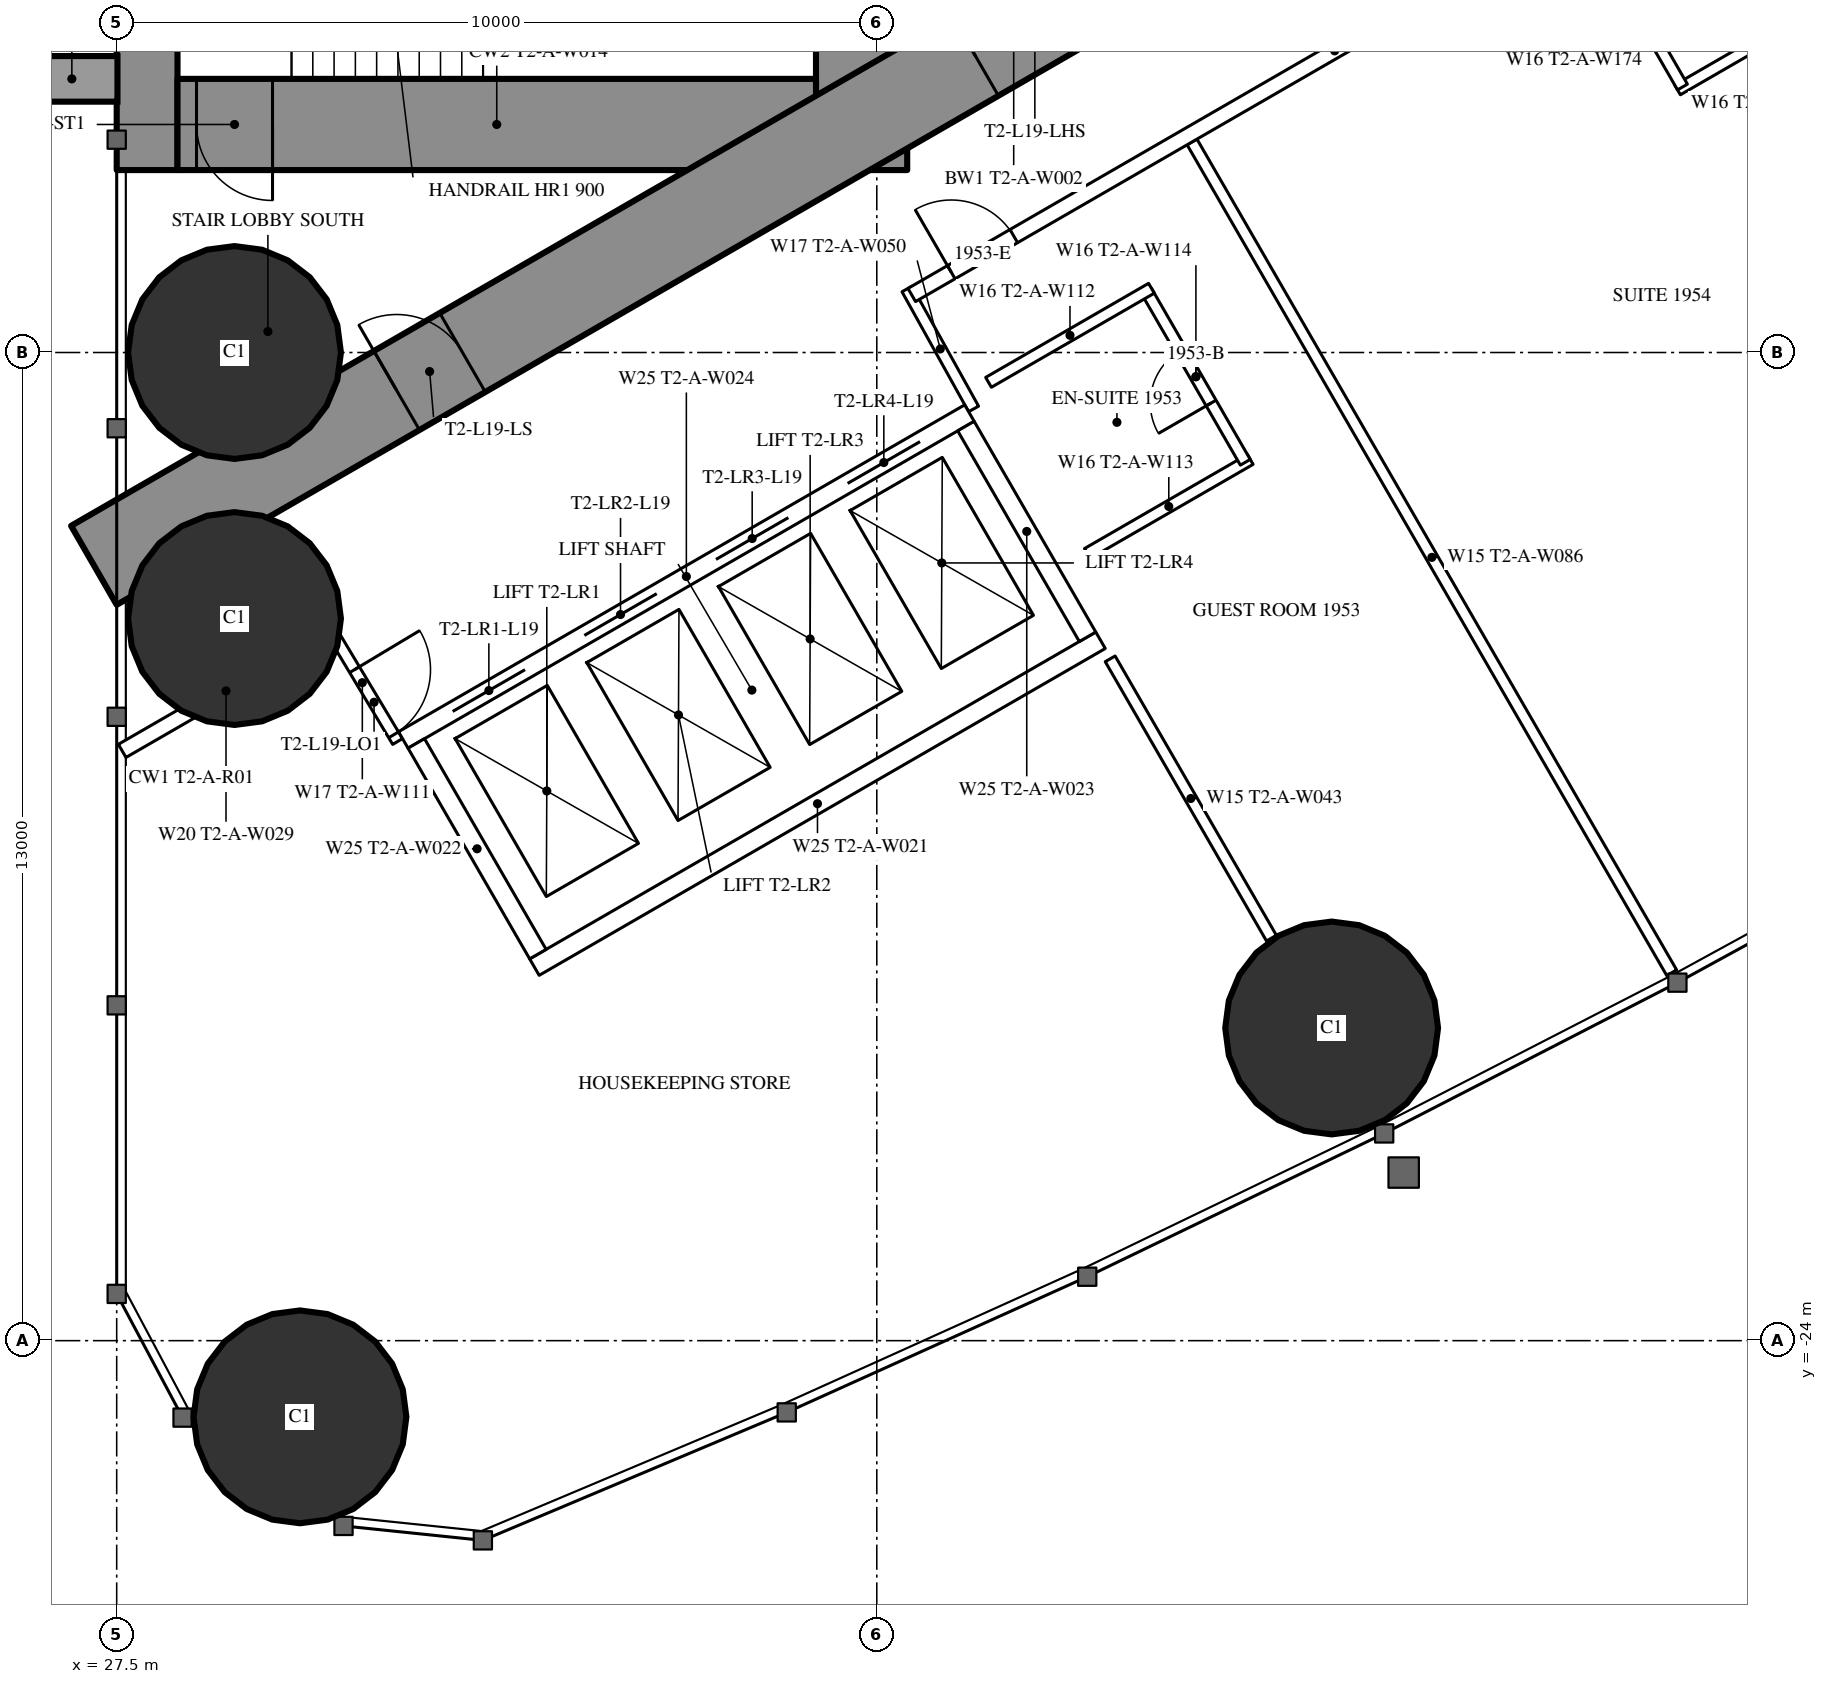
"""IFC4 building model, lengths in metres.
Left out: names, types, materials, properties, quantities, classifications, styles, units other than length and angle.
Written with IfcOpenShell. Run it as: python <this file> out.ifc"""

import sys

from ifc_helpers import new_model, si_unit, direction, frame, frame_2d, origin, origin_2d, place, context, subcontext, project, spatial, rectangle, hollow_circle, extrude, element, fill, save


model = new_model("IFC4")
c1 = context("Model", 3, precision=1e-05, world=origin(), true_north=direction((0.0, 1.0)))
c2 = subcontext(c1, "Body", "Model", "MODEL_VIEW")
j1 = project(units=[si_unit("LENGTHUNIT", "METRE"), si_unit("PLANEANGLEUNIT", "RADIAN")], contexts=[c1])
p1 = place(None, origin())
s1 = spatial("IfcSite", under=j1, at=p1, CompositionType="ELEMENT")
p2 = place(p1, origin())
s2 = spatial("IfcBuilding", under=s1, at=p2, CompositionType="ELEMENT")
p3 = place(p2, frame((0.0, 0.0, 74.0)))
s3 = spatial("IfcBuildingStorey", under=s2, at=p3, CompositionType="ELEMENT", Elevation=74.0)
for number, where, z_axis, x_axis in (
    (1, (29.911, -25.002, 0.0), (0.0, 0.0, 1.0), (1.0, 0.0, 0.0)),
    (2, (29.05, -11.0, 0.0), (0.0, 0.0, 1.0), (1.0, 0.0, 0.0)),
    (3, (29.05, -14.5, 0.0), (0.0, 0.0, 1.0), (1.0, 0.0, 0.0)),
    (4, (43.484, -19.886, 0.0), (0.0, 0.0, 1.0), (1.0, 0.0, 0.0)),
):
    element("IfcColumn", number, at=place(p3, frame(where, z_axis=z_axis, x_axis=x_axis)), inside=s3, PredefinedType="COLUMN", context=c2, shape_type="SweptSolid", body=[
        extrude(hollow_circle(Radius=1.4, WallThickness=0.12, at=origin_2d()), origin(), (0.0, 0.0, 1.0), 3.5),
    ])
p4 = place(p3, frame((27.9, -8.6, 0.0), z_axis=(0.0, 0.0, 1.0), x_axis=(0.0, 1.0, 0.0)))
e5 = element("IfcWall", 5, at=p4, inside=s3, PredefinedType="SHEAR", context=c2, shape_type="SweptSolid", body=[
    extrude(rectangle(XDim=17.2, YDim=0.8, at=frame_2d((8.6, 0.0))), origin(), (0.0, 0.0, 1.0), 3.5),
])
p5 = place(p4, frame((2.45, 0.0, 0.6)))
e6 = element("IfcOpeningElement", 6, at=p5, cuts=e5, PredefinedType="OPENING", context=c2, shape_type="SweptSolid", body=[
    extrude(rectangle(XDim=0.6, YDim=2.1, at=frame_2d((0.3, 1.05))), frame((0.0, 0.41, 0.0), z_axis=(0.0, -1.0, 0.0), x_axis=(1.0, 0.0, 0.0)), (0.0, 0.0, 1.0), 0.82),
])
p6 = place(p4, frame((14.15, 0.0, 0.6)))
e7 = element("IfcOpeningElement", 7, at=p6, cuts=e5, PredefinedType="OPENING", context=c2, shape_type="SweptSolid", body=[
    extrude(rectangle(XDim=0.6, YDim=2.1, at=frame_2d((0.3, 1.05))), frame((0.0, 0.41, 0.0), z_axis=(0.0, -1.0, 0.0), x_axis=(1.0, 0.0, 0.0)), (0.0, 0.0, 1.0), 0.82),
])
p7 = place(p3, frame((37.3, -8.6, 0.0), z_axis=(0.0, 0.0, 1.0), x_axis=(0.0, 1.0, 0.0)))
e8 = element("IfcWall", 8, at=p7, inside=s3, PredefinedType="SHEAR", context=c2, shape_type="SweptSolid", body=[
    extrude(rectangle(XDim=17.2, YDim=1.2, at=frame_2d((8.6, 0.0))), origin(), (0.0, 0.0, 1.0), 3.5),
])
p8 = place(p7, frame((7.7, 0.0, 0.0)))
e9 = element("IfcOpeningElement", 9, at=p8, cuts=e8, PredefinedType="OPENING", context=c2, shape_type="SweptSolid", body=[
    extrude(rectangle(XDim=1.8, YDim=2.2, at=frame_2d((0.9, 1.1))), frame((0.0, 0.61, 0.0), z_axis=(0.0, -1.0, 0.0), x_axis=(1.0, 0.0, 0.0)), (0.0, 0.0, 1.0), 1.22),
])
p9 = place(p3, frame((28.3, -8.0, 0.0), z_axis=(0.0, 0.0, 1.0), x_axis=(1.0, 0.0, 0.0)))
e10 = element("IfcWall", 10, at=p9, inside=s3, PredefinedType="SHEAR", context=c2, shape_type="SweptSolid", body=[
    extrude(rectangle(XDim=8.4, YDim=1.2, at=frame_2d((4.2, 0.0))), origin(), (0.0, 0.0, 1.0), 3.5),
])
p10 = place(p9, frame((0.25, 0.0, 0.0)))
e11 = element("IfcOpeningElement", 11, at=p10, cuts=e10, PredefinedType="OPENING", context=c2, shape_type="SweptSolid", body=[
    extrude(rectangle(XDim=1.0, YDim=2.2, at=frame_2d((0.5, 1.1))), frame((0.0, 0.61, 0.0), z_axis=(0.0, -1.0, 0.0), x_axis=(1.0, 0.0, 0.0)), (0.0, 0.0, 1.0), 1.22),
])
p11 = place(p3, frame((27.2, -13.8, 0.0), z_axis=(0.0, 0.0, 1.0), x_axis=(0.866027159892, 0.499996958321, 0.0)))
e12 = element("IfcWall", 12, at=p11, inside=s3, PredefinedType="SHEAR", context=c2, shape_type="SweptSolid", body=[
    extrude(rectangle(XDim=27.947, YDim=1.2, at=frame_2d((13.973, 0.0))), origin(), (0.0, 0.0, 1.0), 3.5),
])
p12 = place(p11, frame((4.6, 0.0, 0.0)))
e13 = element("IfcOpeningElement", 13, at=p12, cuts=e12, PredefinedType="OPENING", context=c2, shape_type="SweptSolid", body=[
    extrude(rectangle(XDim=1.0, YDim=2.2, at=frame_2d((0.5, 1.1))), frame((0.0, 0.61, 0.0), z_axis=(0.0, -1.0, 0.0), x_axis=(1.0, 0.0, 0.0)), (0.0, 0.0, 1.0), 1.22),
])
p13 = place(p11, frame((13.395, 0.0, 0.0)))
e14 = element("IfcOpeningElement", 14, at=p13, cuts=e12, PredefinedType="OPENING", context=c2, shape_type="SweptSolid", body=[
    extrude(rectangle(XDim=1.8, YDim=2.2, at=frame_2d((0.9, 1.1))), frame((0.0, 0.61, 0.0), z_axis=(0.0, -1.0, 0.0), x_axis=(1.0, 0.0, 0.0)), (0.0, 0.0, 1.0), 1.22),
])
p14 = place(p3, frame((41.647, -8.23, 0.0), z_axis=(0.0, 0.0, 1.0), x_axis=(0.49998590462, -0.866033541603, 0.0)))
e15 = element("IfcWall", 15, at=p14, inside=s3, PredefinedType="PARTITIONING", context=c2, shape_type="SweptSolid", body=[
    extrude(rectangle(XDim=12.621, YDim=0.15, at=frame_2d((6.311, 0.0))), origin(), (0.0, 0.0, 1.0), 3.25),
])
p15 = place(p3, frame((40.57, -15.03, 0.0), z_axis=(0.0, 0.0, 1.0), x_axis=(0.500012993597, -0.866017901798, 0.0)))
e16 = element("IfcWall", 16, at=p15, inside=s3, PredefinedType="PARTITIONING", context=c2, shape_type="SweptSolid", body=[
    extrude(rectangle(XDim=4.243, YDim=0.15, at=frame_2d((2.122, 0.0))), origin(), (0.0, 0.0, 1.0), 3.25),
])
p16 = place(p3, frame((27.572, -16.241, 0.0), z_axis=(0.0, 0.0, 1.0), x_axis=(0.866029654818, 0.499992636921, 0.0)))
e17 = element("IfcWall", 17, at=p16, inside=s3, PredefinedType="PARTITIONING", context=c2, shape_type="SweptSolid", body=[
    extrude(rectangle(XDim=3.155, YDim=0.2, at=frame_2d((1.577, 0.0))), origin(), (0.0, 0.0, 1.0), 3.25),
])
p17 = place(p3, frame((38.773, -11.742, 0.0), z_axis=(0.0, 0.0, 1.0), x_axis=(-0.485528096672, 0.8742210632, 0.0)))
e18 = element("IfcWall", 18, at=p17, inside=s3, PredefinedType="PARTITIONING", context=c2, shape_type="SweptSolid", body=[
    extrude(rectangle(XDim=1.805, YDim=0.15, at=frame_2d((0.903, 0.0))), origin(), (0.0, 0.0, 1.0), 3.25),
])
p18 = place(p3, frame((30.267, -14.569, 0.0), z_axis=(0.0, 0.0, 1.0), x_axis=(0.514336634837, -0.857588377991, 0.0)))
e19 = element("IfcWall", 19, at=p18, inside=s3, PredefinedType="PARTITIONING", context=c2, shape_type="SweptSolid", body=[
    extrude(rectangle(XDim=1.805, YDim=0.15, at=frame_2d((0.903, 0.0))), origin(), (0.0, 0.0, 1.0), 3.25),
])
p19 = place(p18, frame((0.703, 0.0, 0.0)))
e20 = element("IfcOpeningElement", 20, at=p19, cuts=e19, PredefinedType="OPENING", context=c2, shape_type="SweptSolid", body=[
    extrude(rectangle(XDim=1.0, YDim=2.2, at=frame_2d((0.5, 1.1))), frame((0.0, 0.085, 0.0), z_axis=(0.0, -1.0, 0.0), x_axis=(1.0, 0.0, 0.0)), (0.0, 0.0, 1.0), 0.17),
])
p20 = place(p3, frame((37.96, -10.243, 0.0), z_axis=(0.0, 0.0, 1.0), x_axis=(0.866030548046, 0.499991089772, 0.0)))
e21 = element("IfcWall", 21, at=p20, inside=s3, PredefinedType="PARTITIONING", context=c2, shape_type="SweptSolid", body=[
    extrude(rectangle(XDim=12.849, YDim=0.2, at=frame_2d((6.425, 0.0))), origin(), (0.0, 0.0, 1.0), 3.25),
])
p21 = place(p20, frame((8.949, 0.0, 0.0)))
e22 = element("IfcOpeningElement", 22, at=p21, cuts=e21, PredefinedType="OPENING", context=c2, shape_type="SweptSolid", body=[
    extrude(rectangle(XDim=0.95, YDim=2.2, at=frame_2d((0.475, 1.1))), frame((0.0, 0.11, 0.0), z_axis=(0.0, -1.0, 0.0), x_axis=(1.0, 0.0, 0.0)), (0.0, 0.0, 1.0), 0.22),
])
p22 = place(p20, frame((0.6, 0.0, 0.0)))
e23 = element("IfcOpeningElement", 23, at=p22, cuts=e21, PredefinedType="OPENING", context=c2, shape_type="SweptSolid", body=[
    extrude(rectangle(XDim=0.95, YDim=2.2, at=frame_2d((0.475, 1.1))), frame((0.0, 0.11, 0.0), z_axis=(0.0, -1.0, 0.0), x_axis=(1.0, 0.0, 0.0)), (0.0, 0.0, 1.0), 0.22),
])
p23 = place(p3, frame((48.035, -7.545, 0.0), z_axis=(0.0, 0.0, 1.0), x_axis=(0.866006523861, 0.500032699561, 0.0)))
e24 = element("IfcWall", 24, at=p23, inside=s3, PredefinedType="PARTITIONING", context=c2, shape_type="SweptSolid", body=[
    extrude(rectangle(XDim=2.475, YDim=0.15, at=frame_2d((1.237, 0.0))), origin(), (0.0, 0.0, 1.0), 3.25),
])
p24 = place(p3, frame((46.8, -5.255, 0.0), z_axis=(0.0, 0.0, 1.0), x_axis=(0.500006934395, -0.866021400173, 0.0)))
e25 = element("IfcWall", 25, at=p24, inside=s3, PredefinedType="PARTITIONING", context=c2, shape_type="SweptSolid", body=[
    extrude(rectangle(XDim=2.6, YDim=0.15, at=frame_2d((1.3, 0.0))), origin(), (0.0, 0.0, 1.0), 3.25),
])
p25 = place(p24, frame((0.9, 0.0, 0.0)))
e26 = element("IfcOpeningElement", 26, at=p25, cuts=e25, PredefinedType="OPENING", context=c2, shape_type="SweptSolid", body=[
    extrude(rectangle(XDim=0.8, YDim=2.2, at=frame_2d((0.4, 1.1))), frame((0.0, 0.085, 0.0), z_axis=(0.0, -1.0, 0.0), x_axis=(1.0, 0.0, 0.0)), (0.0, 0.0, 1.0), 0.17),
])
p26 = place(p3, frame((40.27, -13.644, 0.0), z_axis=(0.0, 0.0, 1.0), x_axis=(0.866031185235, 0.4999899861, 0.0)))
e27 = element("IfcWall", 27, at=p26, inside=s3, PredefinedType="PARTITIONING", context=c2, shape_type="SweptSolid", body=[
    extrude(rectangle(XDim=2.475, YDim=0.15, at=frame_2d((1.238, 0.0))), origin(), (0.0, 0.0, 1.0), 3.25),
])
p27 = place(p3, frame((41.048, -10.193, 0.0), z_axis=(0.0, 0.0, 1.0), x_axis=(0.500047596559, -0.865997922154, 0.0)))
e28 = element("IfcWall", 28, at=p27, inside=s3, PredefinedType="PARTITIONING", context=c2, shape_type="SweptSolid", body=[
    extrude(rectangle(XDim=2.6, YDim=0.15, at=frame_2d((1.3, 0.0))), origin(), (0.0, 0.0, 1.0), 3.25),
])
p28 = place(p27, frame((0.9, 0.0, 0.0)))
e29 = element("IfcOpeningElement", 29, at=p28, cuts=e28, PredefinedType="OPENING", context=c2, shape_type="SweptSolid", body=[
    extrude(rectangle(XDim=0.8, YDim=2.2, at=frame_2d((0.4, 1.1))), frame((0.0, 0.085, 0.0), z_axis=(0.0, -1.0, 0.0), x_axis=(1.0, 0.0, 0.0)), (0.0, 0.0, 1.0), 0.17),
])
p29 = place(p3, frame((38.97, -11.393, 0.0), z_axis=(0.0, 0.0, 1.0), x_axis=(0.866031185235, 0.4999899861, 0.0)))
e30 = element("IfcWall", 30, at=p29, inside=s3, PredefinedType="PARTITIONING", context=c2, shape_type="SweptSolid", body=[
    extrude(rectangle(XDim=2.475, YDim=0.15, at=frame_2d((1.238, 0.0))), origin(), (0.0, 0.0, 1.0), 3.25),
])
p30 = place(p3, frame((31.271, -16.097, 0.0), z_axis=(0.0, 0.0, 1.0), x_axis=(0.86604045752, 0.499973925258, 0.0)))
e31 = element("IfcWall", 31, at=p30, inside=s3, PredefinedType="PARTITIONING", context=c2, shape_type="SweptSolid", body=[
    extrude(rectangle(XDim=8.6, YDim=0.25, at=frame_2d((4.3, 0.0))), origin(), (0.0, 0.0, 1.0), 3.25),
])
p31 = place(p30, frame((0.75, 0.0, 0.0)))
e32 = element("IfcOpeningElement", 32, at=p31, cuts=e31, PredefinedType="OPENING", context=c2, shape_type="SweptSolid", body=[
    extrude(rectangle(XDim=1.1, YDim=2.2, at=frame_2d((0.55, 1.1))), frame((0.0, 0.135, 0.0), z_axis=(0.0, -1.0, 0.0), x_axis=(1.0, 0.0, 0.0)), (0.0, 0.0, 1.0), 0.27),
])
p32 = place(p30, frame((2.75, 0.0, 0.0)))
e33 = element("IfcOpeningElement", 33, at=p32, cuts=e31, PredefinedType="OPENING", context=c2, shape_type="SweptSolid", body=[
    extrude(rectangle(XDim=1.1, YDim=2.2, at=frame_2d((0.55, 1.1))), frame((0.0, 0.135, 0.0), z_axis=(0.0, -1.0, 0.0), x_axis=(1.0, 0.0, 0.0)), (0.0, 0.0, 1.0), 0.27),
])
p33 = place(p30, frame((4.75, 0.0, 0.0)))
e34 = element("IfcOpeningElement", 34, at=p33, cuts=e31, PredefinedType="OPENING", context=c2, shape_type="SweptSolid", body=[
    extrude(rectangle(XDim=1.1, YDim=2.2, at=frame_2d((0.55, 1.1))), frame((0.0, 0.135, 0.0), z_axis=(0.0, -1.0, 0.0), x_axis=(1.0, 0.0, 0.0)), (0.0, 0.0, 1.0), 0.27),
])
p34 = place(p30, frame((6.75, 0.0, 0.0)))
e35 = element("IfcOpeningElement", 35, at=p34, cuts=e31, PredefinedType="OPENING", context=c2, shape_type="SweptSolid", body=[
    extrude(rectangle(XDim=1.1, YDim=2.2, at=frame_2d((0.55, 1.1))), frame((0.0, 0.135, 0.0), z_axis=(0.0, -1.0, 0.0), x_axis=(1.0, 0.0, 0.0)), (0.0, 0.0, 1.0), 0.27),
])
p35 = place(p3, frame((32.996, -19.086, 0.0), z_axis=(0.0, 0.0, 1.0), x_axis=(0.866028165386, 0.499995216735, 0.0)))
e36 = element("IfcWall", 36, at=p35, inside=s3, PredefinedType="PARTITIONING", context=c2, shape_type="SweptSolid", body=[
    extrude(rectangle(XDim=8.6, YDim=0.25, at=frame_2d((4.3, 0.0))), origin(), (0.0, 0.0, 1.0), 3.25),
])
for number, where, z_axis, x_axis in (
    (37, (31.441, -16.143, 0.0), (0.0, 0.0, 1.0), (0.5, -0.866, 0.0)),
    (38, (38.673, -11.968, 0.0), (0.0, 0.0, 1.0), (0.5, -0.866, 0.0)),
):
    element("IfcWall", number, at=place(p3, frame(where, z_axis=z_axis, x_axis=x_axis)), inside=s3, PredefinedType="PARTITIONING", context=c2, shape_type="SweptSolid", body=[
        extrude(rectangle(XDim=3.201, YDim=0.25, at=frame_2d((1.6, 0.0))), origin(), (0.0, 0.0, 1.0), 3.25),
    ])
p36 = place(p28, origin())
e39 = element("IfcDoor", 39, at=p36, inside=s3, OperationType="SINGLE_SWING_RIGHT", PredefinedType="DOOR", context=c2, shape_type="SweptSolid", body=[
    extrude(rectangle(XDim=0.8, YDim=2.2, at=frame_2d((0.4, 1.1))), frame((0.0, 0.025, 0.0), z_axis=(0.0, -1.0, 0.0), x_axis=(1.0, 0.0, 0.0)), (0.0, 0.0, 1.0), 0.05),
])
fill(e29, e39)
p37 = place(p22, origin())
e40 = element("IfcDoor", 40, at=p37, inside=s3, OperationType="SINGLE_SWING_LEFT", PredefinedType="DOOR", context=c2, shape_type="SweptSolid", body=[
    extrude(rectangle(XDim=0.95, YDim=2.2, at=frame_2d((0.475, 1.1))), frame((0.0, 0.025, 0.0), z_axis=(0.0, -1.0, 0.0), x_axis=(1.0, 0.0, 0.0)), (0.0, 0.0, 1.0), 0.05),
])
fill(e23, e40)
p38 = place(p19, origin())
e41 = element("IfcDoor", 41, at=p38, inside=s3, OperationType="SINGLE_SWING_LEFT", PredefinedType="DOOR", context=c2, shape_type="SweptSolid", body=[
    extrude(rectangle(XDim=1.0, YDim=2.2, at=frame_2d((0.5, 1.1))), frame((0.0, 0.025, 0.0), z_axis=(0.0, -1.0, 0.0), x_axis=(1.0, 0.0, 0.0)), (0.0, 0.0, 1.0), 0.05),
])
fill(e20, e41)
p39 = place(p12, origin())
e42 = element("IfcDoor", 42, at=p39, inside=s3, OperationType="SINGLE_SWING_LEFT", PredefinedType="DOOR", context=c2, shape_type="SweptSolid", body=[
    extrude(rectangle(XDim=1.0, YDim=2.2, at=frame_2d((0.5, 1.1))), frame((0.0, 0.025, 0.0), z_axis=(0.0, -1.0, 0.0), x_axis=(1.0, 0.0, 0.0)), (0.0, 0.0, 1.0), 0.05),
])
fill(e13, e42)
p40 = place(p13, origin())
e43 = element("IfcDoor", 43, at=p40, inside=s3, OperationType="DOUBLE_DOOR_SINGLE_SWING", PredefinedType="DOOR", context=c2, shape_type="SweptSolid", body=[
    extrude(rectangle(XDim=1.8, YDim=2.2, at=frame_2d((0.9, 1.1))), frame((0.0, 0.025, 0.0), z_axis=(0.0, -1.0, 0.0), x_axis=(1.0, 0.0, 0.0)), (0.0, 0.0, 1.0), 0.05),
])
fill(e14, e43)
p41 = place(p10, origin())
e44 = element("IfcDoor", 44, at=p41, inside=s3, OperationType="SINGLE_SWING_RIGHT", PredefinedType="DOOR", context=c2, shape_type="SweptSolid", body=[
    extrude(rectangle(XDim=1.0, YDim=2.2, at=frame_2d((0.5, 1.1))), frame((0.0, 0.025, 0.0), z_axis=(0.0, -1.0, 0.0), x_axis=(1.0, 0.0, 0.0)), (0.0, 0.0, 1.0), 0.05),
])
fill(e11, e44)
p42 = place(p31, origin())
e45 = element("IfcDoor", 45, at=p42, inside=s3, OperationType="DOUBLE_DOOR_SLIDING", PredefinedType="USERDEFINED", context=c2, shape_type="SweptSolid", body=[
    extrude(rectangle(XDim=1.1, YDim=2.2, at=frame_2d((0.55, 1.1))), frame((0.0, 0.025, 0.0), z_axis=(0.0, -1.0, 0.0), x_axis=(1.0, 0.0, 0.0)), (0.0, 0.0, 1.0), 0.05),
])
fill(e32, e45)
p43 = place(p32, origin())
e46 = element("IfcDoor", 46, at=p43, inside=s3, OperationType="DOUBLE_DOOR_SLIDING", PredefinedType="USERDEFINED", context=c2, shape_type="SweptSolid", body=[
    extrude(rectangle(XDim=1.1, YDim=2.2, at=frame_2d((0.55, 1.1))), frame((0.0, 0.025, 0.0), z_axis=(0.0, -1.0, 0.0), x_axis=(1.0, 0.0, 0.0)), (0.0, 0.0, 1.0), 0.05),
])
fill(e33, e46)
p44 = place(p33, origin())
e47 = element("IfcDoor", 47, at=p44, inside=s3, OperationType="DOUBLE_DOOR_SLIDING", PredefinedType="USERDEFINED", context=c2, shape_type="SweptSolid", body=[
    extrude(rectangle(XDim=1.1, YDim=2.2, at=frame_2d((0.55, 1.1))), frame((0.0, 0.025, 0.0), z_axis=(0.0, -1.0, 0.0), x_axis=(1.0, 0.0, 0.0)), (0.0, 0.0, 1.0), 0.05),
])
fill(e34, e47)
p45 = place(p34, origin())
e48 = element("IfcDoor", 48, at=p45, inside=s3, OperationType="DOUBLE_DOOR_SLIDING", PredefinedType="USERDEFINED", context=c2, shape_type="SweptSolid", body=[
    extrude(rectangle(XDim=1.1, YDim=2.2, at=frame_2d((0.55, 1.1))), frame((0.0, 0.025, 0.0), z_axis=(0.0, -1.0, 0.0), x_axis=(1.0, 0.0, 0.0)), (0.0, 0.0, 1.0), 0.05),
])
fill(e35, e48)
save(model, sys.argv[1])
